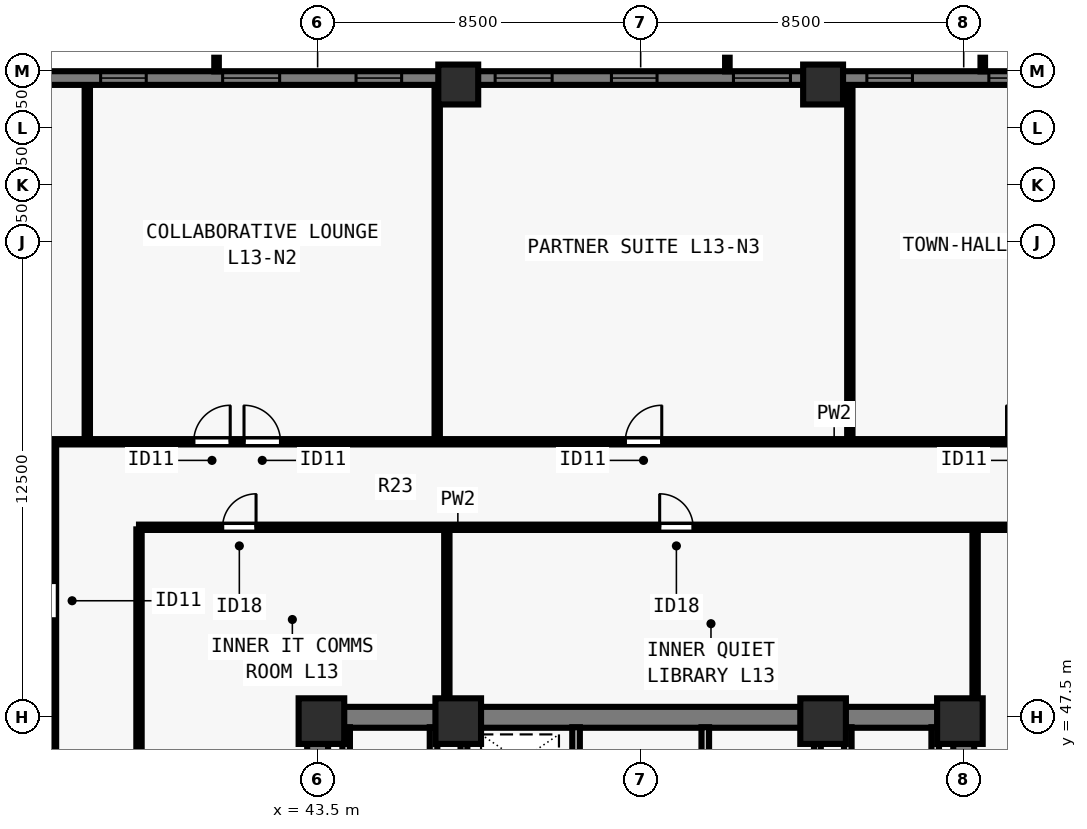
"""IFC4 building model, lengths in metres.
Left out: names, types, materials, properties, quantities, classifications, styles, units other than length and angle.
Written with IfcOpenShell. Run it as: python <this file> out.ifc"""

import sys

from ifc_helpers import new_model, si_unit, direction, frame, frame_2d, origin, origin_2d, place, context, subcontext, project, spatial, rectangle, extrude, element, fill, save


model = new_model("IFC4")
c1 = context("Model", 3, precision=1e-05, world=origin(), true_north=direction((0.0, 1.0)))
c2 = subcontext(c1, "Body", "Model", "MODEL_VIEW")
j1 = project(units=[si_unit("LENGTHUNIT", "METRE"), si_unit("PLANEANGLEUNIT", "RADIAN")], contexts=[c1])
p1 = place(None, origin())
s1 = spatial("IfcSite", under=j1, at=p1, CompositionType="ELEMENT")
p2 = place(p1, origin())
s2 = spatial("IfcBuilding", under=s1, at=p2, CompositionType="ELEMENT")
p3 = place(p2, frame((0.0, 0.0, 51.5)))
s3 = spatial("IfcBuildingStorey", under=s2, at=p3, CompositionType="ELEMENT", Elevation=51.5)
for number, where, z_axis, x_axis in (
    (1, (43.6, 47.4, 0.0), (0.0, 0.0, 1.0), (1.0, 0.0, 0.0)),
    (2, (47.2, 47.4, 0.0), (0.0, 0.0, 1.0), (1.0, 0.0, 0.0)),
    (3, (56.8, 47.4, 0.0), (0.0, 0.0, 1.0), (1.0, 0.0, 0.0)),
    (4, (60.4, 47.4, 0.0), (0.0, 0.0, 1.0), (1.0, 0.0, 0.0)),
):
    element("IfcColumn", number, at=place(p3, frame(where, z_axis=z_axis, x_axis=x_axis)), inside=s3, PredefinedType="COLUMN", context=c2, shape_type="SweptSolid", body=[
        extrude(rectangle(XDim=1.2, YDim=1.2, at=origin_2d()), origin(), (0.0, 0.0, 1.0), 3.5),
    ])
for number, where, z_axis, x_axis in (
    (5, (56.8, 64.15, 0.0), (0.0, 0.0, 1.0), (1.0, 0.0, 0.0)),
    (6, (47.2, 64.15, 0.0), (0.0, 0.0, 1.0), (1.0, 0.0, 0.0)),
):
    element("IfcColumn", number, at=place(p3, frame(where, z_axis=z_axis, x_axis=x_axis)), inside=s3, PredefinedType="COLUMN", context=c2, shape_type="SweptSolid", body=[
        extrude(rectangle(XDim=1.05, YDim=1.05, at=origin_2d()), origin(), (0.0, 0.0, 1.0), 3.5),
    ])
p4 = place(p3, frame((29.5, 64.32, 0.0), z_axis=(0.0, 0.0, 1.0), x_axis=(1.0, 0.0, 0.0)))
e7 = element("IfcWall", 7, at=p4, inside=s3, PredefinedType="SOLIDWALL", context=c2, shape_type="SweptSolid", body=[
    extrude(rectangle(XDim=44.662, YDim=0.36, at=frame_2d((22.331, 0.0))), origin(), (0.0, 0.0, 1.0), 3.28),
])
p5 = place(p4, frame((4.78, 0.0, 0.8)))
e8 = element("IfcOpeningElement", 8, at=p5, cuts=e7, PredefinedType="OPENING", context=c2, shape_type="SweptSolid", body=[
    extrude(rectangle(XDim=1.5, YDim=1.544, at=frame_2d((0.75, 0.772))), frame((0.0, 0.19, 0.0), z_axis=(0.0, -1.0, 0.0), x_axis=(1.0, 0.0, 0.0)), (0.0, 0.0, 1.0), 0.38),
])
p6 = place(p4, frame((8.29, 0.0, 0.8)))
e9 = element("IfcOpeningElement", 9, at=p6, cuts=e7, PredefinedType="OPENING", context=c2, shape_type="SweptSolid", body=[
    extrude(rectangle(XDim=1.2, YDim=1.544, at=frame_2d((0.6, 0.772))), frame((0.0, 0.19, 0.0), z_axis=(0.0, -1.0, 0.0), x_axis=(1.0, 0.0, 0.0)), (0.0, 0.0, 1.0), 0.38),
])
p7 = place(p4, frame((11.5, 0.0, 0.8)))
e10 = element("IfcOpeningElement", 10, at=p7, cuts=e7, PredefinedType="OPENING", context=c2, shape_type="SweptSolid", body=[
    extrude(rectangle(XDim=1.5, YDim=1.544, at=frame_2d((0.75, 0.772))), frame((0.0, 0.19, 0.0), z_axis=(0.0, -1.0, 0.0), x_axis=(1.0, 0.0, 0.0)), (0.0, 0.0, 1.0), 0.38),
])
p8 = place(p4, frame((15.01, 0.0, 0.8)))
e11 = element("IfcOpeningElement", 11, at=p8, cuts=e7, PredefinedType="OPENING", context=c2, shape_type="SweptSolid", body=[
    extrude(rectangle(XDim=1.2, YDim=1.544, at=frame_2d((0.6, 0.772))), frame((0.0, 0.19, 0.0), z_axis=(0.0, -1.0, 0.0), x_axis=(1.0, 0.0, 0.0)), (0.0, 0.0, 1.0), 0.38),
])
p9 = place(p4, frame((18.671, 0.0, 0.8)))
e12 = element("IfcOpeningElement", 12, at=p9, cuts=e7, PredefinedType="OPENING", context=c2, shape_type="SweptSolid", body=[
    extrude(rectangle(XDim=1.5, YDim=1.544, at=frame_2d((0.75, 0.772))), frame((0.0, 0.19, 0.0), z_axis=(0.0, -1.0, 0.0), x_axis=(1.0, 0.0, 0.0)), (0.0, 0.0, 1.0), 0.38),
])
p10 = place(p4, frame((21.731, 0.0, 0.8)))
e13 = element("IfcOpeningElement", 13, at=p10, cuts=e7, PredefinedType="OPENING", context=c2, shape_type="SweptSolid", body=[
    extrude(rectangle(XDim=1.2, YDim=1.544, at=frame_2d((0.6, 0.772))), frame((0.0, 0.19, 0.0), z_axis=(0.0, -1.0, 0.0), x_axis=(1.0, 0.0, 0.0)), (0.0, 0.0, 1.0), 0.38),
])
p11 = place(p4, frame((24.941, 0.0, 0.8)))
e14 = element("IfcOpeningElement", 14, at=p11, cuts=e7, PredefinedType="OPENING", context=c2, shape_type="SweptSolid", body=[
    extrude(rectangle(XDim=1.5, YDim=1.544, at=frame_2d((0.75, 0.772))), frame((0.0, 0.19, 0.0), z_axis=(0.0, -1.0, 0.0), x_axis=(1.0, 0.0, 0.0)), (0.0, 0.0, 1.0), 0.38),
])
p12 = place(p4, frame((28.451, 0.0, 0.8)))
e15 = element("IfcOpeningElement", 15, at=p12, cuts=e7, PredefinedType="OPENING", context=c2, shape_type="SweptSolid", body=[
    extrude(rectangle(XDim=1.2, YDim=1.544, at=frame_2d((0.6, 0.772))), frame((0.0, 0.19, 0.0), z_axis=(0.0, -1.0, 0.0), x_axis=(1.0, 0.0, 0.0)), (0.0, 0.0, 1.0), 0.38),
])
p13 = place(p4, frame((31.662, 0.0, 0.8)))
e16 = element("IfcOpeningElement", 16, at=p13, cuts=e7, PredefinedType="OPENING", context=c2, shape_type="SweptSolid", body=[
    extrude(rectangle(XDim=1.5, YDim=1.544, at=frame_2d((0.75, 0.772))), frame((0.0, 0.19, 0.0), z_axis=(0.0, -1.0, 0.0), x_axis=(1.0, 0.0, 0.0)), (0.0, 0.0, 1.0), 0.38),
])
p14 = place(p4, frame((35.172, 0.0, 0.8)))
e17 = element("IfcOpeningElement", 17, at=p14, cuts=e7, PredefinedType="OPENING", context=c2, shape_type="SweptSolid", body=[
    extrude(rectangle(XDim=1.2, YDim=1.544, at=frame_2d((0.6, 0.772))), frame((0.0, 0.19, 0.0), z_axis=(0.0, -1.0, 0.0), x_axis=(1.0, 0.0, 0.0)), (0.0, 0.0, 1.0), 0.38),
])
p15 = place(p4, frame((38.382, 0.0, 0.8)))
e18 = element("IfcOpeningElement", 18, at=p15, cuts=e7, PredefinedType="OPENING", context=c2, shape_type="SweptSolid", body=[
    extrude(rectangle(XDim=1.5, YDim=1.544, at=frame_2d((0.75, 0.772))), frame((0.0, 0.19, 0.0), z_axis=(0.0, -1.0, 0.0), x_axis=(1.0, 0.0, 0.0)), (0.0, 0.0, 1.0), 0.38),
])
p16 = place(p3, frame((43.225, 47.5, 0.0), z_axis=(0.0, 0.0, 1.0), x_axis=(1.0, 0.0, 0.0)))
e19 = element("IfcWall", 19, at=p16, inside=s3, PredefinedType="SHEAR", context=c2, shape_type="SweptSolid", body=[
    extrude(rectangle(XDim=17.55, YDim=0.55, at=frame_2d((8.775, 0.0))), origin(), (0.0, 0.0, 1.0), 3.28),
])
for number, where, z_axis, x_axis in (
    (20, (43.5, 40.8, 0.0), (0.0, 0.0, 1.0), (0.0, 1.0, 0.0)),
    (21, (60.5, 40.8, 0.0), (0.0, 0.0, 1.0), (0.0, 1.0, 0.0)),
):
    element("IfcWall", number, at=place(p3, frame(where, z_axis=z_axis, x_axis=x_axis)), inside=s3, PredefinedType="SHEAR", context=c2, shape_type="SweptSolid", body=[
        extrude(rectangle(XDim=6.435, YDim=0.55, at=frame_2d((3.218, 0.0))), origin(), (0.0, 0.0, 1.0), 3.28),
    ])
p17 = place(p3, frame((50.3, 40.585, 0.0), z_axis=(0.0, 0.0, 1.0), x_axis=(0.0, 1.0, 0.0)))
e22 = element("IfcWall", 22, at=p17, inside=s3, PredefinedType="SOLIDWALL", context=c2, shape_type="SweptSolid", body=[
    extrude(rectangle(XDim=6.655, YDim=0.2, at=frame_2d((3.328, 0.0))), origin(), (0.0, 0.0, 1.0), 3.28),
])
p18 = place(p17, frame((5.065, 0.0, 0.0)))
e23 = element("IfcOpeningElement", 23, at=p18, cuts=e22, PredefinedType="OPENING", context=c2, shape_type="SweptSolid", body=[
    extrude(rectangle(XDim=0.8, YDim=2.08, at=frame_2d((0.4, 1.04))), frame((0.0, 0.11, 0.0), z_axis=(0.0, -1.0, 0.0), x_axis=(1.0, 0.0, 0.0)), (0.0, 0.0, 1.0), 0.22),
])
p19 = place(p3, frame((53.7, 40.585, 0.0), z_axis=(0.0, 0.0, 1.0), x_axis=(0.0, 1.0, 0.0)))
e24 = element("IfcWall", 24, at=p19, inside=s3, PredefinedType="SOLIDWALL", context=c2, shape_type="SweptSolid", body=[
    extrude(rectangle(XDim=6.655, YDim=0.2, at=frame_2d((3.328, 0.0))), origin(), (0.0, 0.0, 1.0), 3.28),
])
p20 = place(p19, frame((0.195, 0.0, 0.0)))
e25 = element("IfcOpeningElement", 25, at=p20, cuts=e24, PredefinedType="OPENING", context=c2, shape_type="SweptSolid", body=[
    extrude(rectangle(XDim=0.8, YDim=2.08, at=frame_2d((0.4, 1.04))), frame((0.0, 0.11, 0.0), z_axis=(0.0, -1.0, 0.0), x_axis=(1.0, 0.0, 0.0)), (0.0, 0.0, 1.0), 0.22),
])
p21 = place(p19, frame((4.265, 0.0, 0.0)))
e26 = element("IfcOpeningElement", 26, at=p21, cuts=e24, PredefinedType="OPENING", context=c2, shape_type="SweptSolid", body=[
    extrude(rectangle(XDim=0.95, YDim=2.12, at=frame_2d((0.475, 1.06))), frame((0.0, 0.11, 0.0), z_axis=(0.0, -1.0, 0.0), x_axis=(1.0, 0.0, 0.0)), (0.0, 0.0, 1.0), 0.22),
])
for number, where, z_axis, x_axis in (
    (27, (46.55, 43.735, 0.0), (0.0, 0.0, 1.0), (0.0, 1.0, 0.0)),
    (28, (44.25, 43.735, 0.0), (0.0, 0.0, 1.0), (0.0, 1.0, 0.0)),
    (29, (57.45, 43.735, 0.0), (0.0, 0.0, 1.0), (0.0, 1.0, 0.0)),
    (30, (59.75, 43.735, 0.0), (0.0, 0.0, 1.0), (0.0, 1.0, 0.0)),
):
    element("IfcWall", number, at=place(p3, frame(where, z_axis=z_axis, x_axis=x_axis)), inside=s3, PredefinedType="SOLIDWALL", context=c2, shape_type="SweptSolid", body=[
        extrude(rectangle(XDim=3.505, YDim=0.2, at=frame_2d((1.752, 0.0))), origin(), (0.0, 0.0, 1.0), 3.28),
    ])
for number, where, z_axis, x_axis in (
    (31, (47.35, 43.735, 0.0), (0.0, 0.0, 1.0), (0.0, 1.0, 0.0)),
    (32, (56.65, 43.735, 0.0), (0.0, 0.0, 1.0), (0.0, 1.0, 0.0)),
):
    element("IfcWall", number, at=place(p3, frame(where, z_axis=z_axis, x_axis=x_axis)), inside=s3, PredefinedType="SOLIDWALL", context=c2, shape_type="SweptSolid", body=[
        extrude(rectangle(XDim=3.505, YDim=0.18, at=frame_2d((1.752, 0.0))), origin(), (0.0, 0.0, 1.0), 3.28),
    ])
p22 = place(p3, frame((36.55, 54.75, 0.0), z_axis=(0.0, 0.0, 1.0), x_axis=(1.0, 0.0, 0.0)))
e33 = element("IfcWall", 33, at=p22, inside=s3, PredefinedType="PARTITIONING", context=c2, shape_type="SweptSolid", body=[
    extrude(rectangle(XDim=30.9, YDim=0.14, at=frame_2d((15.45, 0.0))), origin(), (0.0, 0.0, 1.0), 3.28),
])
p23 = place(p22, frame((3.69, 0.0, 0.0)))
e34 = element("IfcOpeningElement", 34, at=p23, cuts=e33, PredefinedType="OPENING", context=c2, shape_type="SweptSolid", body=[
    extrude(rectangle(XDim=0.96, YDim=2.12, at=frame_2d((0.48, 1.06))), frame((0.0, 0.08, 0.0), z_axis=(0.0, -1.0, 0.0), x_axis=(1.0, 0.0, 0.0)), (0.0, 0.0, 1.0), 0.16),
])
p24 = place(p22, frame((5.013, 0.0, 0.0)))
e35 = element("IfcOpeningElement", 35, at=p24, cuts=e33, PredefinedType="OPENING", context=c2, shape_type="SweptSolid", body=[
    extrude(rectangle(XDim=0.96, YDim=2.12, at=frame_2d((0.48, 1.06))), frame((0.0, 0.08, 0.0), z_axis=(0.0, -1.0, 0.0), x_axis=(1.0, 0.0, 0.0)), (0.0, 0.0, 1.0), 0.16),
])
p25 = place(p22, frame((15.045, 0.0, 0.0)))
e36 = element("IfcOpeningElement", 36, at=p25, cuts=e33, PredefinedType="OPENING", context=c2, shape_type="SweptSolid", body=[
    extrude(rectangle(XDim=0.96, YDim=2.12, at=frame_2d((0.48, 1.06))), frame((0.0, 0.08, 0.0), z_axis=(0.0, -1.0, 0.0), x_axis=(1.0, 0.0, 0.0)), (0.0, 0.0, 1.0), 0.16),
])
p26 = place(p22, frame((25.077, 0.0, 0.0)))
e37 = element("IfcOpeningElement", 37, at=p26, cuts=e33, PredefinedType="OPENING", context=c2, shape_type="SweptSolid", body=[
    extrude(rectangle(XDim=0.96, YDim=2.12, at=frame_2d((0.48, 1.06))), frame((0.0, 0.08, 0.0), z_axis=(0.0, -1.0, 0.0), x_axis=(1.0, 0.0, 0.0)), (0.0, 0.0, 1.0), 0.16),
])
p27 = place(p22, frame((28.92, 0.0, 0.0)))
e38 = element("IfcOpeningElement", 38, at=p27, cuts=e33, PredefinedType="OPENING", context=c2, shape_type="SweptSolid", body=[
    extrude(rectangle(XDim=0.96, YDim=2.12, at=frame_2d((0.48, 1.06))), frame((0.0, 0.08, 0.0), z_axis=(0.0, -1.0, 0.0), x_axis=(1.0, 0.0, 0.0)), (0.0, 0.0, 1.0), 0.16),
])
p28 = place(p3, frame((36.55, 23.305, 0.0), z_axis=(0.0, 0.0, 1.0), x_axis=(0.0, 1.0, 0.0)))
e39 = element("IfcWall", 39, at=p28, inside=s3, PredefinedType="PARTITIONING", context=c2, shape_type="SweptSolid", body=[
    extrude(rectangle(XDim=31.39, YDim=0.14, at=frame_2d((15.695, 0.0))), origin(), (0.0, 0.0, 1.0), 3.28),
])
p29 = place(p28, frame((3.307, 0.0, 0.0)))
e40 = element("IfcOpeningElement", 40, at=p29, cuts=e39, PredefinedType="OPENING", context=c2, shape_type="SweptSolid", body=[
    extrude(rectangle(XDim=0.96, YDim=2.12, at=frame_2d((0.48, 1.06))), frame((0.0, 0.08, 0.0), z_axis=(0.0, -1.0, 0.0), x_axis=(1.0, 0.0, 0.0)), (0.0, 0.0, 1.0), 0.16),
])
p30 = place(p28, frame((11.25, 0.0, 0.0)))
e41 = element("IfcOpeningElement", 41, at=p30, cuts=e39, PredefinedType="OPENING", context=c2, shape_type="SweptSolid", body=[
    extrude(rectangle(XDim=0.96, YDim=2.12, at=frame_2d((0.48, 1.06))), frame((0.0, 0.08, 0.0), z_axis=(0.0, -1.0, 0.0), x_axis=(1.0, 0.0, 0.0)), (0.0, 0.0, 1.0), 0.16),
])
p31 = place(p28, frame((19.075, 0.0, 0.0)))
e42 = element("IfcOpeningElement", 42, at=p31, cuts=e39, PredefinedType="OPENING", context=c2, shape_type="SweptSolid", body=[
    extrude(rectangle(XDim=0.96, YDim=2.12, at=frame_2d((0.48, 1.06))), frame((0.0, 0.08, 0.0), z_axis=(0.0, -1.0, 0.0), x_axis=(1.0, 0.0, 0.0)), (0.0, 0.0, 1.0), 0.16),
])
p32 = place(p28, frame((26.782, 0.0, 0.0)))
e43 = element("IfcOpeningElement", 43, at=p32, cuts=e39, PredefinedType="OPENING", context=c2, shape_type="SweptSolid", body=[
    extrude(rectangle(XDim=0.96, YDim=2.12, at=frame_2d((0.48, 1.06))), frame((0.0, 0.08, 0.0), z_axis=(0.0, -1.0, 0.0), x_axis=(1.0, 0.0, 0.0)), (0.0, 0.0, 1.0), 0.16),
])
p33 = place(p3, frame((38.8, 52.5, 0.0), z_axis=(0.0, 0.0, 1.0), x_axis=(1.0, 0.0, 0.0)))
e44 = element("IfcWall", 44, at=p33, inside=s3, PredefinedType="PARTITIONING", context=c2, shape_type="SweptSolid", body=[
    extrude(rectangle(XDim=26.4, YDim=0.14, at=frame_2d((13.2, 0.0))), origin(), (0.0, 0.0, 1.0), 3.28),
])
p34 = place(p33, frame((2.2, 0.0, 0.0)))
e45 = element("IfcOpeningElement", 45, at=p34, cuts=e44, PredefinedType="OPENING", context=c2, shape_type="SweptSolid", body=[
    extrude(rectangle(XDim=0.88, YDim=2.1, at=frame_2d((0.44, 1.05))), frame((0.0, 0.08, 0.0), z_axis=(0.0, -1.0, 0.0), x_axis=(1.0, 0.0, 0.0)), (0.0, 0.0, 1.0), 0.16),
])
p35 = place(p33, frame((13.7, 0.0, 0.0)))
e46 = element("IfcOpeningElement", 46, at=p35, cuts=e44, PredefinedType="OPENING", context=c2, shape_type="SweptSolid", body=[
    extrude(rectangle(XDim=0.88, YDim=2.1, at=frame_2d((0.44, 1.05))), frame((0.0, 0.08, 0.0), z_axis=(0.0, -1.0, 0.0), x_axis=(1.0, 0.0, 0.0)), (0.0, 0.0, 1.0), 0.16),
])
p36 = place(p33, frame((23.2, 0.0, 0.0)))
e47 = element("IfcOpeningElement", 47, at=p36, cuts=e44, PredefinedType="OPENING", context=c2, shape_type="SweptSolid", body=[
    extrude(rectangle(XDim=0.88, YDim=2.1, at=frame_2d((0.44, 1.05))), frame((0.0, 0.08, 0.0), z_axis=(0.0, -1.0, 0.0), x_axis=(1.0, 0.0, 0.0)), (0.0, 0.0, 1.0), 0.16),
])
p37 = place(p3, frame((38.8, 40.8, 0.0), z_axis=(0.0, 0.0, 1.0), x_axis=(0.0, 1.0, 0.0)))
e48 = element("IfcWall", 48, at=p37, inside=s3, PredefinedType="PARTITIONING", context=c2, shape_type="SweptSolid", body=[
    extrude(rectangle(XDim=11.645, YDim=0.14, at=frame_2d((5.823, 0.0))), origin(), (0.0, 0.0, 1.0), 3.28),
])
p38 = place(p37, frame((2.5, 0.0, 0.0)))
e49 = element("IfcOpeningElement", 49, at=p38, cuts=e48, PredefinedType="OPENING", context=c2, shape_type="SweptSolid", body=[
    extrude(rectangle(XDim=0.88, YDim=2.1, at=frame_2d((0.44, 1.05))), frame((0.0, 0.08, 0.0), z_axis=(0.0, -1.0, 0.0), x_axis=(1.0, 0.0, 0.0)), (0.0, 0.0, 1.0), 0.16),
])
p39 = place(p3, frame((46.9, 47.76, 0.0), z_axis=(0.0, 0.0, 1.0), x_axis=(0.0, 1.0, 0.0)))
e50 = element("IfcWall", 50, at=p39, inside=s3, PredefinedType="PARTITIONING", context=c2, shape_type="SweptSolid", body=[
    extrude(rectangle(XDim=4.685, YDim=0.14, at=frame_2d((2.343, 0.0))), origin(), (0.0, 0.0, 1.0), 3.28),
])
p40 = place(p3, frame((60.8, 47.76, 0.0), z_axis=(0.0, 0.0, 1.0), x_axis=(0.0, 1.0, 0.0)))
e51 = element("IfcWall", 51, at=p40, inside=s3, PredefinedType="PARTITIONING", context=c2, shape_type="SweptSolid", body=[
    extrude(rectangle(XDim=4.685, YDim=0.14, at=frame_2d((2.343, 0.0))), origin(), (0.0, 0.0, 1.0), 2.439),
])
for number, where, z_axis, x_axis in (
    (52, (37.439, 54.85, 0.0), (0.0, 0.0, 1.0), (0.0, 1.0, 0.0)),
    (53, (46.646, 54.85, 0.0), (0.0, 0.0, 1.0), (0.0, 1.0, 0.0)),
    (54, (57.503, 54.85, 0.0), (0.0, 0.0, 1.0), (0.0, 1.0, 0.0)),
):
    element("IfcWall", number, at=place(p3, frame(where, z_axis=z_axis, x_axis=x_axis)), inside=s3, PredefinedType="PARTITIONING", context=c2, shape_type="SweptSolid", body=[
        extrude(rectangle(XDim=9.23, YDim=0.14, at=frame_2d((4.615, 0.0))), origin(), (0.0, 0.0, 1.0), 3.28),
    ])
p41 = place(p6, origin())
e55 = element("IfcWindow", 55, at=p41, inside=s3, PartitioningType="SINGLE_PANEL", PredefinedType="WINDOW", context=c2, shape_type="SweptSolid", body=[
    extrude(rectangle(XDim=1.2, YDim=1.544, at=frame_2d((0.6, 0.772))), frame((0.0, -0.05, 0.0), z_axis=(0.0, -1.0, 0.0), x_axis=(1.0, 0.0, 0.0)), (0.0, 0.0, 1.0), 0.06),
])
fill(e9, e55)
p42 = place(p7, origin())
e56 = element("IfcWindow", 56, at=p42, inside=s3, PartitioningType="SINGLE_PANEL", PredefinedType="WINDOW", context=c2, shape_type="SweptSolid", body=[
    extrude(rectangle(XDim=1.5, YDim=1.544, at=frame_2d((0.75, 0.772))), frame((0.0, -0.05, 0.0), z_axis=(0.0, -1.0, 0.0), x_axis=(1.0, 0.0, 0.0)), (0.0, 0.0, 1.0), 0.06),
])
fill(e10, e56)
p43 = place(p8, origin())
e57 = element("IfcWindow", 57, at=p43, inside=s3, PartitioningType="SINGLE_PANEL", PredefinedType="WINDOW", context=c2, shape_type="SweptSolid", body=[
    extrude(rectangle(XDim=1.2, YDim=1.544, at=frame_2d((0.6, 0.772))), frame((0.0, -0.05, 0.0), z_axis=(0.0, -1.0, 0.0), x_axis=(1.0, 0.0, 0.0)), (0.0, 0.0, 1.0), 0.06),
])
fill(e11, e57)
p44 = place(p9, origin())
e58 = element("IfcWindow", 58, at=p44, inside=s3, PartitioningType="SINGLE_PANEL", PredefinedType="WINDOW", context=c2, shape_type="SweptSolid", body=[
    extrude(rectangle(XDim=1.5, YDim=1.544, at=frame_2d((0.75, 0.772))), frame((0.0, -0.05, 0.0), z_axis=(0.0, -1.0, 0.0), x_axis=(1.0, 0.0, 0.0)), (0.0, 0.0, 1.0), 0.06),
])
fill(e12, e58)
p45 = place(p10, origin())
e59 = element("IfcWindow", 59, at=p45, inside=s3, PartitioningType="SINGLE_PANEL", PredefinedType="WINDOW", context=c2, shape_type="SweptSolid", body=[
    extrude(rectangle(XDim=1.2, YDim=1.544, at=frame_2d((0.6, 0.772))), frame((0.0, -0.05, 0.0), z_axis=(0.0, -1.0, 0.0), x_axis=(1.0, 0.0, 0.0)), (0.0, 0.0, 1.0), 0.06),
])
fill(e13, e59)
p46 = place(p11, origin())
e60 = element("IfcWindow", 60, at=p46, inside=s3, PartitioningType="SINGLE_PANEL", PredefinedType="WINDOW", context=c2, shape_type="SweptSolid", body=[
    extrude(rectangle(XDim=1.5, YDim=1.544, at=frame_2d((0.75, 0.772))), frame((0.0, -0.05, 0.0), z_axis=(0.0, -1.0, 0.0), x_axis=(1.0, 0.0, 0.0)), (0.0, 0.0, 1.0), 0.06),
])
fill(e14, e60)
p47 = place(p12, origin())
e61 = element("IfcWindow", 61, at=p47, inside=s3, PartitioningType="SINGLE_PANEL", PredefinedType="WINDOW", context=c2, shape_type="SweptSolid", body=[
    extrude(rectangle(XDim=1.2, YDim=1.544, at=frame_2d((0.6, 0.772))), frame((0.0, -0.05, 0.0), z_axis=(0.0, -1.0, 0.0), x_axis=(1.0, 0.0, 0.0)), (0.0, 0.0, 1.0), 0.06),
])
fill(e15, e61)
p48 = place(p13, origin())
e62 = element("IfcWindow", 62, at=p48, inside=s3, PartitioningType="SINGLE_PANEL", PredefinedType="WINDOW", context=c2, shape_type="SweptSolid", body=[
    extrude(rectangle(XDim=1.5, YDim=1.544, at=frame_2d((0.75, 0.772))), frame((0.0, -0.05, 0.0), z_axis=(0.0, -1.0, 0.0), x_axis=(1.0, 0.0, 0.0)), (0.0, 0.0, 1.0), 0.06),
])
fill(e16, e62)
p49 = place(p34, origin())
e63 = element("IfcDoor", 63, at=p49, inside=s3, OperationType="SINGLE_SWING_RIGHT", PredefinedType="DOOR", context=c2, shape_type="SweptSolid", body=[
    extrude(rectangle(XDim=0.88, YDim=2.1, at=frame_2d((0.44, 1.05))), frame((0.0, 0.025, 0.0), z_axis=(0.0, -1.0, 0.0), x_axis=(1.0, 0.0, 0.0)), (0.0, 0.0, 1.0), 0.05),
])
fill(e45, e63)
p50 = place(p35, origin())
e64 = element("IfcDoor", 64, at=p50, inside=s3, OperationType="SINGLE_SWING_LEFT", PredefinedType="DOOR", context=c2, shape_type="SweptSolid", body=[
    extrude(rectangle(XDim=0.88, YDim=2.1, at=frame_2d((0.44, 1.05))), frame((0.0, 0.025, 0.0), z_axis=(0.0, -1.0, 0.0), x_axis=(1.0, 0.0, 0.0)), (0.0, 0.0, 1.0), 0.05),
])
fill(e46, e64)
p51 = place(p23, origin())
e65 = element("IfcDoor", 65, at=p51, inside=s3, OperationType="SINGLE_SWING_RIGHT", PredefinedType="DOOR", context=c2, shape_type="SweptSolid", body=[
    extrude(rectangle(XDim=0.96, YDim=2.12, at=frame_2d((0.48, 1.06))), frame((0.0, 0.025, 0.0), z_axis=(0.0, -1.0, 0.0), x_axis=(1.0, 0.0, 0.0)), (0.0, 0.0, 1.0), 0.05),
])
fill(e34, e65)
p52 = place(p24, origin())
e66 = element("IfcDoor", 66, at=p52, inside=s3, OperationType="SINGLE_SWING_LEFT", PredefinedType="DOOR", context=c2, shape_type="SweptSolid", body=[
    extrude(rectangle(XDim=0.96, YDim=2.12, at=frame_2d((0.48, 1.06))), frame((0.0, 0.025, 0.0), z_axis=(0.0, -1.0, 0.0), x_axis=(1.0, 0.0, 0.0)), (0.0, 0.0, 1.0), 0.05),
])
fill(e35, e66)
p53 = place(p25, origin())
e67 = element("IfcDoor", 67, at=p53, inside=s3, OperationType="SINGLE_SWING_RIGHT", PredefinedType="DOOR", context=c2, shape_type="SweptSolid", body=[
    extrude(rectangle(XDim=0.96, YDim=2.12, at=frame_2d((0.48, 1.06))), frame((0.0, 0.025, 0.0), z_axis=(0.0, -1.0, 0.0), x_axis=(1.0, 0.0, 0.0)), (0.0, 0.0, 1.0), 0.05),
])
fill(e36, e67)
p54 = place(p26, origin())
e68 = element("IfcDoor", 68, at=p54, inside=s3, OperationType="SINGLE_SWING_LEFT", PredefinedType="DOOR", context=c2, shape_type="SweptSolid", body=[
    extrude(rectangle(XDim=0.96, YDim=2.12, at=frame_2d((0.48, 1.06))), frame((0.0, 0.025, 0.0), z_axis=(0.0, -1.0, 0.0), x_axis=(1.0, 0.0, 0.0)), (0.0, 0.0, 1.0), 0.05),
])
fill(e37, e68)
p55 = place(p32, origin())
e69 = element("IfcDoor", 69, at=p55, inside=s3, OperationType="SINGLE_SWING_RIGHT", PredefinedType="DOOR", context=c2, shape_type="SweptSolid", body=[
    extrude(rectangle(XDim=0.96, YDim=2.12, at=frame_2d((0.48, 1.06))), frame((0.0, 0.025, 0.0), z_axis=(0.0, -1.0, 0.0), x_axis=(1.0, 0.0, 0.0)), (0.0, 0.0, 1.0), 0.05),
])
fill(e43, e69)
save(model, sys.argv[1])
